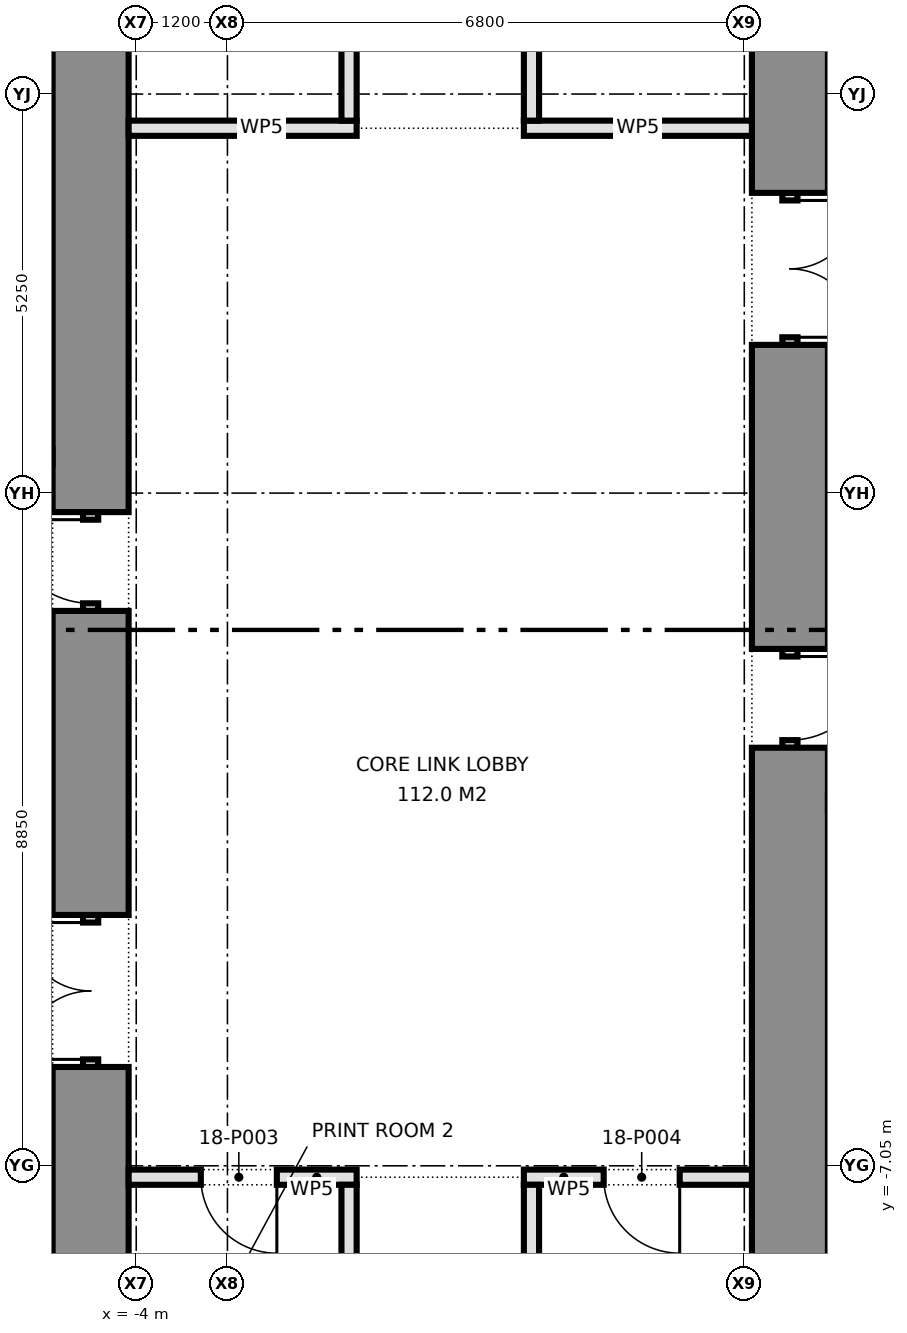
"""IFC4 building model, lengths in metres.
Left out: names, types, materials, properties, quantities, classifications, styles, units other than length and angle.
Written with IfcOpenShell. Run it as: python <this file> out.ifc"""

import sys

from ifc_helpers import new_model, si_unit, direction, frame, frame_2d, origin, place, context, subcontext, project, spatial, rectangle, extrude, element, fill, save


model = new_model("IFC4")
c1 = context("Model", 3, precision=1e-05, world=origin(), true_north=direction((0.0, 1.0)))
c2 = subcontext(c1, "Body", "Model", "MODEL_VIEW")
j1 = project(units=[si_unit("LENGTHUNIT", "METRE"), si_unit("PLANEANGLEUNIT", "RADIAN")], contexts=[c1])
p1 = place(None, origin())
s1 = spatial("IfcSite", under=j1, at=p1, CompositionType="ELEMENT")
p2 = place(p1, origin())
s2 = spatial("IfcBuilding", under=s1, at=p2, CompositionType="ELEMENT")
p3 = place(p2, frame((0.0, 0.0, 82.0)))
s3 = spatial("IfcBuildingStorey", under=s2, at=p3, CompositionType="ELEMENT", Elevation=82.0)
p4 = place(p3, frame((-4.6, -8.9, 0.0), z_axis=(0.0, 0.0, 1.0), x_axis=(0.0, 1.0, 0.0)))
e1 = element("IfcWall", 1, at=p4, inside=s3, PredefinedType="SHEAR", context=c2, shape_type="SweptSolid", body=[
    extrude(rectangle(XDim=3.15, YDim=1.0, at=frame_2d((1.575, 0.0))), origin(), (0.0, 0.0, 1.0), 4.2),
])
p5 = place(p3, frame((-4.6, -5.75, 0.0), z_axis=(0.0, 0.0, 1.0), x_axis=(0.0, 1.0, 0.0)))
e2 = element("IfcWall", 2, at=p5, inside=s3, PredefinedType="PARTITIONING", context=c2, shape_type="SweptSolid", body=[
    extrude(rectangle(XDim=2.0, YDim=0.2, at=frame_2d((1.0, 0.0))), origin(), (0.0, 0.0, 1.0), 2.4),
])
p6 = place(p5, frame((0.1, 0.0, 0.0)))
e3 = element("IfcOpeningElement", 3, at=p6, cuts=e2, PredefinedType="OPENING", context=c2, shape_type="SweptSolid", body=[
    extrude(rectangle(XDim=1.8, YDim=2.1, at=frame_2d((0.9, 1.05))), frame((0.0, 0.11, 0.0), z_axis=(0.0, -1.0, 0.0), x_axis=(1.0, 0.0, 0.0)), (0.0, 0.0, 1.0), 0.22),
])
p7 = place(p3, frame((-4.6, -3.75, 0.0), z_axis=(0.0, 0.0, 1.0), x_axis=(0.0, 1.0, 0.0)))
e4 = element("IfcWall", 4, at=p7, inside=s3, PredefinedType="SHEAR", context=c2, shape_type="SweptSolid", body=[
    extrude(rectangle(XDim=4.0, YDim=1.0, at=frame_2d((2.0, 0.0))), origin(), (0.0, 0.0, 1.0), 4.2),
])
p8 = place(p3, frame((-4.6, 0.25, 0.0), z_axis=(0.0, 0.0, 1.0), x_axis=(0.0, 1.0, 0.0)))
e5 = element("IfcWall", 5, at=p8, inside=s3, PredefinedType="PARTITIONING", context=c2, shape_type="SweptSolid", body=[
    extrude(rectangle(XDim=1.3, YDim=0.2, at=frame_2d((0.65, 0.0))), origin(), (0.0, 0.0, 1.0), 2.4),
])
p9 = place(p8, frame((0.1, 0.0, 0.0)))
e6 = element("IfcOpeningElement", 6, at=p9, cuts=e5, PredefinedType="OPENING", context=c2, shape_type="SweptSolid", body=[
    extrude(rectangle(XDim=1.1, YDim=2.1, at=frame_2d((0.55, 1.05))), frame((0.0, 0.11, 0.0), z_axis=(0.0, -1.0, 0.0), x_axis=(1.0, 0.0, 0.0)), (0.0, 0.0, 1.0), 0.22),
])
p10 = place(p3, frame((-4.6, 1.55, 0.0), z_axis=(0.0, 0.0, 1.0), x_axis=(0.0, 1.0, 0.0)))
e7 = element("IfcWall", 7, at=p10, inside=s3, PredefinedType="SHEAR", context=c2, shape_type="SweptSolid", body=[
    extrude(rectangle(XDim=7.35, YDim=1.0, at=frame_2d((3.675, 0.0))), origin(), (0.0, 0.0, 1.0), 4.2),
])
p11 = place(p3, frame((4.6, 8.9, 0.0), z_axis=(0.0, 0.0, 1.0), x_axis=(0.0, -1.0, 0.0)))
e8 = element("IfcWall", 8, at=p11, inside=s3, PredefinedType="SHEAR", context=c2, shape_type="SweptSolid", body=[
    extrude(rectangle(XDim=3.15, YDim=1.0, at=frame_2d((1.575, 0.0))), origin(), (0.0, 0.0, 1.0), 4.2),
])
p12 = place(p3, frame((4.6, 5.75, 0.0), z_axis=(0.0, 0.0, 1.0), x_axis=(0.0, -1.0, 0.0)))
e9 = element("IfcWall", 9, at=p12, inside=s3, PredefinedType="PARTITIONING", context=c2, shape_type="SweptSolid", body=[
    extrude(rectangle(XDim=2.0, YDim=0.2, at=frame_2d((1.0, 0.0))), origin(), (0.0, 0.0, 1.0), 2.4),
])
p13 = place(p12, frame((0.1, 0.0, 0.0)))
e10 = element("IfcOpeningElement", 10, at=p13, cuts=e9, PredefinedType="OPENING", context=c2, shape_type="SweptSolid", body=[
    extrude(rectangle(XDim=1.8, YDim=2.1, at=frame_2d((0.9, 1.05))), frame((0.0, 0.11, 0.0), z_axis=(0.0, -1.0, 0.0), x_axis=(1.0, 0.0, 0.0)), (0.0, 0.0, 1.0), 0.22),
])
p14 = place(p3, frame((4.6, 3.75, 0.0), z_axis=(0.0, 0.0, 1.0), x_axis=(0.0, -1.0, 0.0)))
e11 = element("IfcWall", 11, at=p14, inside=s3, PredefinedType="SHEAR", context=c2, shape_type="SweptSolid", body=[
    extrude(rectangle(XDim=4.0, YDim=1.0, at=frame_2d((2.0, 0.0))), origin(), (0.0, 0.0, 1.0), 4.2),
])
p15 = place(p3, frame((4.6, -0.25, 0.0), z_axis=(0.0, 0.0, 1.0), x_axis=(0.0, -1.0, 0.0)))
e12 = element("IfcWall", 12, at=p15, inside=s3, PredefinedType="PARTITIONING", context=c2, shape_type="SweptSolid", body=[
    extrude(rectangle(XDim=1.3, YDim=0.2, at=frame_2d((0.65, 0.0))), origin(), (0.0, 0.0, 1.0), 2.4),
])
p16 = place(p15, frame((0.1, 0.0, 0.0)))
e13 = element("IfcOpeningElement", 13, at=p16, cuts=e12, PredefinedType="OPENING", context=c2, shape_type="SweptSolid", body=[
    extrude(rectangle(XDim=1.1, YDim=2.1, at=frame_2d((0.55, 1.05))), frame((0.0, 0.11, 0.0), z_axis=(0.0, -1.0, 0.0), x_axis=(1.0, 0.0, 0.0)), (0.0, 0.0, 1.0), 0.22),
])
p17 = place(p3, frame((4.6, -1.55, 0.0), z_axis=(0.0, 0.0, 1.0), x_axis=(0.0, -1.0, 0.0)))
e14 = element("IfcWall", 14, at=p17, inside=s3, PredefinedType="SHEAR", context=c2, shape_type="SweptSolid", body=[
    extrude(rectangle(XDim=7.35, YDim=1.0, at=frame_2d((3.675, 0.0))), origin(), (0.0, 0.0, 1.0), 4.2),
])
p18 = place(p3, frame((-4.1, -7.2, 0.0), z_axis=(0.0, 0.0, 1.0), x_axis=(1.0, 0.0, 0.0)))
e15 = element("IfcWall", 15, at=p18, inside=s3, PredefinedType="PARTITIONING", context=c2, shape_type="SweptSolid", body=[
    extrude(rectangle(XDim=3.0, YDim=0.2, at=frame_2d((1.5, 0.0))), origin(), (0.0, 0.0, 1.0), 4.2),
])
p19 = place(p18, frame((0.95, 0.0, 0.0)))
e16 = element("IfcOpeningElement", 16, at=p19, cuts=e15, PredefinedType="OPENING", context=c2, shape_type="SweptSolid", body=[
    extrude(rectangle(XDim=1.0, YDim=2.1, at=frame_2d((0.5, 1.05))), frame((0.0, 0.11, 0.0), z_axis=(0.0, -1.0, 0.0), x_axis=(1.0, 0.0, 0.0)), (0.0, 0.0, 1.0), 0.22),
])
p20 = place(p3, frame((1.1, -7.2, 0.0), z_axis=(0.0, 0.0, 1.0), x_axis=(1.0, 0.0, 0.0)))
e17 = element("IfcWall", 17, at=p20, inside=s3, PredefinedType="PARTITIONING", context=c2, shape_type="SweptSolid", body=[
    extrude(rectangle(XDim=3.0, YDim=0.2, at=frame_2d((1.5, 0.0))), origin(), (0.0, 0.0, 1.0), 4.2),
])
p21 = place(p20, frame((1.05, 0.0, 0.0)))
e18 = element("IfcOpeningElement", 18, at=p21, cuts=e17, PredefinedType="OPENING", context=c2, shape_type="SweptSolid", body=[
    extrude(rectangle(XDim=1.0, YDim=2.1, at=frame_2d((0.5, 1.05))), frame((0.0, 0.11, 0.0), z_axis=(0.0, -1.0, 0.0), x_axis=(1.0, 0.0, 0.0)), (0.0, 0.0, 1.0), 0.22),
])
for number, where, z_axis, x_axis in (
    (19, (-4.1, 6.6, 0.0), (0.0, 0.0, 1.0), (1.0, 0.0, 0.0)),
    (20, (1.1, 6.6, 0.0), (0.0, 0.0, 1.0), (1.0, 0.0, 0.0)),
):
    element("IfcWall", number, at=place(p3, frame(where, z_axis=z_axis, x_axis=x_axis)), inside=s3, PredefinedType="PARTITIONING", context=c2, shape_type="SweptSolid", body=[
        extrude(rectangle(XDim=3.0, YDim=0.2, at=frame_2d((1.5, 0.0))), origin(), (0.0, 0.0, 1.0), 4.2),
    ])
p22 = place(p3, frame((1.2, -9.8, 0.0), z_axis=(0.0, 0.0, 1.0), x_axis=(0.0, 1.0, 0.0)))
e21 = element("IfcWall", 21, at=p22, inside=s3, PredefinedType="PARTITIONING", context=c2, shape_type="SweptSolid", body=[
    extrude(rectangle(XDim=2.5, YDim=0.2, at=frame_2d((1.25, 0.0))), origin(), (0.0, 0.0, 1.0), 4.2),
])
p23 = place(p3, frame((1.2, 6.7, 0.0), z_axis=(0.0, 0.0, 1.0), x_axis=(0.0, 1.0, 0.0)))
e22 = element("IfcWall", 22, at=p23, inside=s3, PredefinedType="PARTITIONING", context=c2, shape_type="SweptSolid", body=[
    extrude(rectangle(XDim=3.1, YDim=0.2, at=frame_2d((1.55, 0.0))), origin(), (0.0, 0.0, 1.0), 4.2),
])
p24 = place(p23, frame((1.05, 0.0, 0.0)))
e23 = element("IfcOpeningElement", 23, at=p24, cuts=e22, PredefinedType="OPENING", context=c2, shape_type="SweptSolid", body=[
    extrude(rectangle(XDim=1.0, YDim=2.1, at=frame_2d((0.5, 1.05))), frame((0.0, 0.11, 0.0), z_axis=(0.0, -1.0, 0.0), x_axis=(1.0, 0.0, 0.0)), (0.0, 0.0, 1.0), 0.22),
])
p25 = place(p3, frame((-1.2, -9.8, 0.0), z_axis=(0.0, 0.0, 1.0), x_axis=(0.0, 1.0, 0.0)))
e24 = element("IfcWall", 24, at=p25, inside=s3, PredefinedType="PARTITIONING", context=c2, shape_type="SweptSolid", body=[
    extrude(rectangle(XDim=2.5, YDim=0.2, at=frame_2d((1.25, 0.0))), origin(), (0.0, 0.0, 1.0), 4.2),
])
p26 = place(p3, frame((-1.2, 6.7, 0.0), z_axis=(0.0, 0.0, 1.0), x_axis=(0.0, 1.0, 0.0)))
e25 = element("IfcWall", 25, at=p26, inside=s3, PredefinedType="PARTITIONING", context=c2, shape_type="SweptSolid", body=[
    extrude(rectangle(XDim=3.1, YDim=0.2, at=frame_2d((1.55, 0.0))), origin(), (0.0, 0.0, 1.0), 4.2),
])
p27 = place(p26, frame((1.05, 0.0, 0.0)))
e26 = element("IfcOpeningElement", 26, at=p27, cuts=e25, PredefinedType="OPENING", context=c2, shape_type="SweptSolid", body=[
    extrude(rectangle(XDim=1.0, YDim=2.1, at=frame_2d((0.5, 1.05))), frame((0.0, 0.11, 0.0), z_axis=(0.0, -1.0, 0.0), x_axis=(1.0, 0.0, 0.0)), (0.0, 0.0, 1.0), 0.22),
])
p28 = place(p6, origin())
e27 = element("IfcDoor", 27, at=p28, inside=s3, OperationType="DOUBLE_DOOR_SINGLE_SWING", PredefinedType="DOOR", context=c2, shape_type="SweptSolid", body=[
    extrude(rectangle(XDim=1.8, YDim=2.1, at=frame_2d((0.9, 1.05))), frame((0.0, 0.025, 0.0), z_axis=(0.0, -1.0, 0.0), x_axis=(1.0, 0.0, 0.0)), (0.0, 0.0, 1.0), 0.05),
])
fill(e3, e27)
p29 = place(p9, origin())
e28 = element("IfcDoor", 28, at=p29, inside=s3, OperationType="SINGLE_SWING_RIGHT", PredefinedType="DOOR", context=c2, shape_type="SweptSolid", body=[
    extrude(rectangle(XDim=1.1, YDim=2.1, at=frame_2d((0.55, 1.05))), frame((0.0, 0.025, 0.0), z_axis=(0.0, -1.0, 0.0), x_axis=(1.0, 0.0, 0.0)), (0.0, 0.0, 1.0), 0.05),
])
fill(e6, e28)
p30 = place(p13, origin())
e29 = element("IfcDoor", 29, at=p30, inside=s3, OperationType="DOUBLE_DOOR_SINGLE_SWING", PredefinedType="DOOR", context=c2, shape_type="SweptSolid", body=[
    extrude(rectangle(XDim=1.8, YDim=2.1, at=frame_2d((0.9, 1.05))), frame((0.0, 0.025, 0.0), z_axis=(0.0, -1.0, 0.0), x_axis=(1.0, 0.0, 0.0)), (0.0, 0.0, 1.0), 0.05),
])
fill(e10, e29)
p31 = place(p16, origin())
e30 = element("IfcDoor", 30, at=p31, inside=s3, OperationType="SINGLE_SWING_LEFT", PredefinedType="DOOR", context=c2, shape_type="SweptSolid", body=[
    extrude(rectangle(XDim=1.1, YDim=2.1, at=frame_2d((0.55, 1.05))), frame((0.0, 0.025, 0.0), z_axis=(0.0, -1.0, 0.0), x_axis=(1.0, 0.0, 0.0)), (0.0, 0.0, 1.0), 0.05),
])
fill(e13, e30)
p32 = place(p19, frame((1.0, 0.0, 0.0), z_axis=(0.0, 0.0, 1.0), x_axis=(-1.0, 0.0, 0.0)))
e31 = element("IfcDoor", 31, at=p32, inside=s3, OperationType="SINGLE_SWING_LEFT", PredefinedType="DOOR", context=c2, shape_type="SweptSolid", body=[
    extrude(rectangle(XDim=1.0, YDim=2.1, at=frame_2d((0.5, 1.05))), frame((0.0, 0.025, 0.0), z_axis=(0.0, -1.0, 0.0), x_axis=(1.0, 0.0, 0.0)), (0.0, 0.0, 1.0), 0.05),
])
fill(e16, e31)
p33 = place(p21, frame((1.0, 0.0, 0.0), z_axis=(0.0, 0.0, 1.0), x_axis=(-1.0, 0.0, 0.0)))
e32 = element("IfcDoor", 32, at=p33, inside=s3, OperationType="SINGLE_SWING_LEFT", PredefinedType="DOOR", context=c2, shape_type="SweptSolid", body=[
    extrude(rectangle(XDim=1.0, YDim=2.1, at=frame_2d((0.5, 1.05))), frame((0.0, 0.025, 0.0), z_axis=(0.0, -1.0, 0.0), x_axis=(1.0, 0.0, 0.0)), (0.0, 0.0, 1.0), 0.05),
])
fill(e18, e32)
save(model, sys.argv[1])
